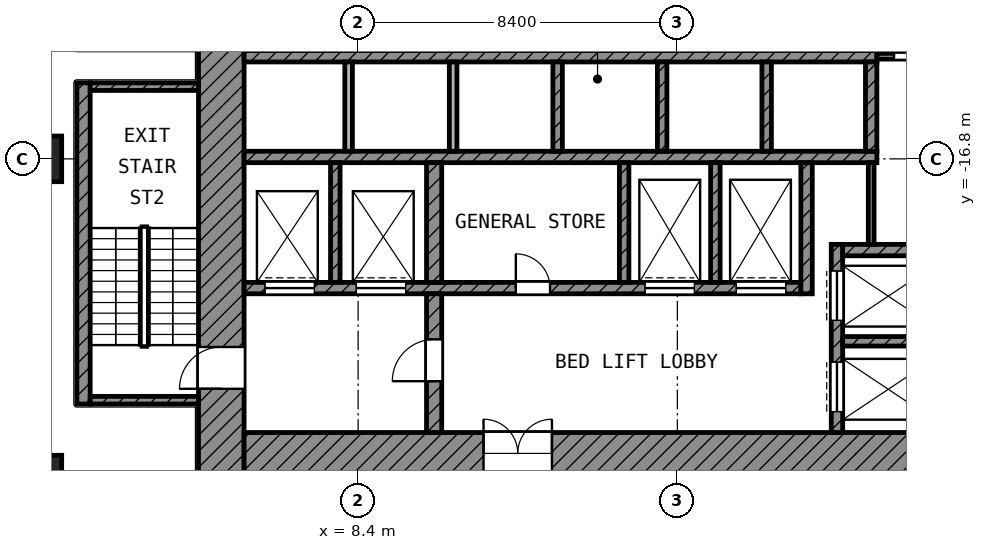
"""IFC4 building model, lengths in metres.
Left out: names, types, materials, properties, quantities, classifications, styles, units other than length and angle.
Written with IfcOpenShell. Run it as: python <this file> out.ifc"""

import sys

from ifc_helpers import new_model, si_unit, direction, frame, frame_2d, origin, origin_2d, place, context, subcontext, project, spatial, rectangle, extrude, element, fill, save


model = new_model("IFC4")
c1 = context("Model", 3, precision=1e-05, world=origin(), true_north=direction((0.0, 1.0)))
c2 = subcontext(c1, "Body", "Model", "MODEL_VIEW")
j1 = project(units=[si_unit("LENGTHUNIT", "METRE"), si_unit("PLANEANGLEUNIT", "RADIAN")], contexts=[c1])
p1 = place(None, origin())
s1 = spatial("IfcSite", under=j1, at=p1, CompositionType="ELEMENT")
p2 = place(p1, origin())
s2 = spatial("IfcBuilding", under=s1, at=p2, CompositionType="ELEMENT")
p3 = place(p2, frame((0.0, 0.0, 81.2)))
s3 = spatial("IfcBuildingStorey", under=s2, at=p3, CompositionType="ELEMENT", Elevation=81.2)
for number, where, z_axis, x_axis in (
    (1, (0.0, -16.8, 0.0), (0.0, 0.0, 1.0), (1.0, 0.0, 0.0)),
    (2, (0.0, -25.2, 0.0), (0.0, 0.0, 1.0), (1.0, 0.0, 0.0)),
):
    element("IfcColumn", number, at=place(p3, frame(where, z_axis=z_axis, x_axis=x_axis)), inside=s3, PredefinedType="COLUMN", context=c2, shape_type="SweptSolid", body=[
        extrude(rectangle(XDim=1.2, YDim=1.2, at=origin_2d()), origin(), (0.0, 0.0, 1.0), 4.2),
    ])
p4 = place(p3, frame((4.8, -25.1, 0.0), z_axis=(0.0, 0.0, 1.0), x_axis=(0.0, 1.0, 0.0)))
e3 = element("IfcWall", 3, at=p4, inside=s3, PredefinedType="SHEAR", context=c2, shape_type="SweptSolid", body=[
    extrude(rectangle(XDim=19.7, YDim=1.2, at=frame_2d((9.85, 0.0))), origin(), (0.0, 0.0, 1.0), 3.9),
])
p5 = place(p4, frame((11.55, 0.0, 0.0)))
e4 = element("IfcOpeningElement", 4, at=p5, cuts=e3, PredefinedType="OPENING", context=c2, shape_type="SweptSolid", body=[
    extrude(rectangle(XDim=1.1, YDim=2.1, at=frame_2d((0.55, 1.05))), frame((0.0, 0.61, 0.0), z_axis=(0.0, -1.0, 0.0), x_axis=(1.0, 0.0, 0.0)), (0.0, 0.0, 1.0), 1.22),
])
p6 = place(p4, frame((2.25, 0.0, 0.0)))
e5 = element("IfcOpeningElement", 5, at=p6, cuts=e3, PredefinedType="OPENING", context=c2, shape_type="SweptSolid", body=[
    extrude(rectangle(XDim=1.1, YDim=2.1, at=frame_2d((0.55, 1.05))), frame((0.0, 0.61, 0.0), z_axis=(0.0, -1.0, 0.0), x_axis=(1.0, 0.0, 0.0)), (0.0, 0.0, 1.0), 1.22),
])
p7 = place(p3, frame((5.4, -24.55, 0.0), z_axis=(0.0, 0.0, 1.0), x_axis=(1.0, 0.0, 0.0)))
e6 = element("IfcWall", 6, at=p7, inside=s3, PredefinedType="SHEAR", context=c2, shape_type="SweptSolid", body=[
    extrude(rectangle(XDim=18.6, YDim=1.1, at=frame_2d((9.3, 0.0))), origin(), (0.0, 0.0, 1.0), 3.9),
])
p8 = place(p7, frame((6.3, 0.0, 0.0)))
e7 = element("IfcOpeningElement", 7, at=p8, cuts=e6, PredefinedType="OPENING", context=c2, shape_type="SweptSolid", body=[
    extrude(rectangle(XDim=1.8, YDim=2.1, at=frame_2d((0.9, 1.05))), frame((0.0, 0.56, 0.0), z_axis=(0.0, -1.0, 0.0), x_axis=(1.0, 0.0, 0.0)), (0.0, 0.0, 1.0), 1.12),
])
for number, where, z_axis, x_axis in (
    (8, (5.4, -14.1, 0.0), (0.0, 0.0, 1.0), (1.0, 0.0, 0.0)),
    (9, (5.4, -16.75, 0.0), (0.0, 0.0, 1.0), (1.0, 0.0, 0.0)),
):
    element("IfcWall", number, at=place(p3, frame(where, z_axis=z_axis, x_axis=x_axis)), inside=s3, PredefinedType="SHEAR", context=c2, shape_type="SweptSolid", body=[
        extrude(rectangle(XDim=16.65, YDim=0.3, at=frame_2d((8.325, 0.0))), origin(), (0.0, 0.0, 1.0), 3.9),
    ])
p9 = place(p3, frame((5.4, -20.2, 0.0), z_axis=(0.0, 0.0, 1.0), x_axis=(1.0, 0.0, 0.0)))
e10 = element("IfcWall", 10, at=p9, inside=s3, PredefinedType="SHEAR", context=c2, shape_type="SweptSolid", body=[
    extrude(rectangle(XDim=14.65, YDim=0.3, at=frame_2d((7.325, 0.0))), origin(), (0.0, 0.0, 1.0), 3.9),
])
p10 = place(p9, frame((10.55, 0.0, 0.0)))
e11 = element("IfcOpeningElement", 11, at=p10, cuts=e10, PredefinedType="OPENING", context=c2, shape_type="SweptSolid", body=[
    extrude(rectangle(XDim=1.3, YDim=2.1, at=frame_2d((0.65, 1.05))), frame((0.0, 0.16, 0.0), z_axis=(0.0, -1.0, 0.0), x_axis=(1.0, 0.0, 0.0)), (0.0, 0.0, 1.0), 0.32),
])
p11 = place(p9, frame((12.95, 0.0, 0.0)))
e12 = element("IfcOpeningElement", 12, at=p11, cuts=e10, PredefinedType="OPENING", context=c2, shape_type="SweptSolid", body=[
    extrude(rectangle(XDim=1.3, YDim=2.1, at=frame_2d((0.65, 1.05))), frame((0.0, 0.16, 0.0), z_axis=(0.0, -1.0, 0.0), x_axis=(1.0, 0.0, 0.0)), (0.0, 0.0, 1.0), 0.32),
])
p12 = place(p9, frame((0.55, 0.0, 0.0)))
e13 = element("IfcOpeningElement", 13, at=p12, cuts=e10, PredefinedType="OPENING", context=c2, shape_type="SweptSolid", body=[
    extrude(rectangle(XDim=1.3, YDim=2.1, at=frame_2d((0.65, 1.05))), frame((0.0, 0.16, 0.0), z_axis=(0.0, -1.0, 0.0), x_axis=(1.0, 0.0, 0.0)), (0.0, 0.0, 1.0), 0.32),
])
p13 = place(p9, frame((2.95, 0.0, 0.0)))
e14 = element("IfcOpeningElement", 14, at=p13, cuts=e10, PredefinedType="OPENING", context=c2, shape_type="SweptSolid", body=[
    extrude(rectangle(XDim=1.3, YDim=2.1, at=frame_2d((0.65, 1.05))), frame((0.0, 0.16, 0.0), z_axis=(0.0, -1.0, 0.0), x_axis=(1.0, 0.0, 0.0)), (0.0, 0.0, 1.0), 0.32),
])
p14 = place(p9, frame((7.15, 0.0, 0.0)))
e15 = element("IfcOpeningElement", 15, at=p14, cuts=e10, PredefinedType="OPENING", context=c2, shape_type="SweptSolid", body=[
    extrude(rectangle(XDim=0.9, YDim=2.1, at=frame_2d((0.45, 1.05))), frame((0.0, 0.16, 0.0), z_axis=(0.0, -1.0, 0.0), x_axis=(1.0, 0.0, 0.0)), (0.0, 0.0, 1.0), 0.32),
])
p15 = place(p3, frame((10.4, -24.0, 0.0), z_axis=(0.0, 0.0, 1.0), x_axis=(0.0, 1.0, 0.0)))
e16 = element("IfcWall", 16, at=p15, inside=s3, PredefinedType="SHEAR", context=c2, shape_type="SweptSolid", body=[
    extrude(rectangle(XDim=3.65, YDim=0.4, at=frame_2d((1.825, 0.0))), origin(), (0.0, 0.0, 1.0), 3.9),
])
p16 = place(p15, frame((1.35, 0.0, 0.0)))
e17 = element("IfcOpeningElement", 17, at=p16, cuts=e16, PredefinedType="OPENING", context=c2, shape_type="SweptSolid", body=[
    extrude(rectangle(XDim=1.1, YDim=2.1, at=frame_2d((0.55, 1.05))), frame((0.0, 0.21, 0.0), z_axis=(0.0, -1.0, 0.0), x_axis=(1.0, 0.0, 0.0)), (0.0, 0.0, 1.0), 0.42),
])
p17 = place(p3, frame((10.4, -20.05, 0.0), z_axis=(0.0, 0.0, 1.0), x_axis=(0.0, 1.0, 0.0)))
e18 = element("IfcWall", 18, at=p17, inside=s3, PredefinedType="SHEAR", context=c2, shape_type="SweptSolid", body=[
    extrude(rectangle(XDim=3.15, YDim=0.4, at=frame_2d((1.575, 0.0))), origin(), (0.0, 0.0, 1.0), 3.9),
])
p18 = place(p3, frame((20.2, -20.35, 0.0), z_axis=(0.0, 0.0, 1.0), x_axis=(0.0, 1.0, 0.0)))
e19 = element("IfcWall", 19, at=p18, inside=s3, PredefinedType="SHEAR", context=c2, shape_type="SweptSolid", body=[
    extrude(rectangle(XDim=3.45, YDim=0.3, at=frame_2d((1.725, 0.0))), origin(), (0.0, 0.0, 1.0), 3.9),
])
p19 = place(p3, frame((21.9, -16.6, 0.0), z_axis=(0.0, 0.0, 1.0), x_axis=(0.0, 1.0, 0.0)))
e20 = element("IfcWall", 20, at=p19, inside=s3, PredefinedType="SHEAR", context=c2, shape_type="SweptSolid", body=[
    extrude(rectangle(XDim=2.35, YDim=0.3, at=frame_2d((1.175, 0.0))), origin(), (0.0, 0.0, 1.0), 3.9),
])
p20 = place(p3, frame((21.15, -19.2, 0.0), z_axis=(0.0, 0.0, 1.0), x_axis=(1.0, 0.0, 0.0)))
e21 = element("IfcWall", 21, at=p20, inside=s3, PredefinedType="SHEAR", context=c2, shape_type="SweptSolid", body=[
    extrude(rectangle(XDim=2.85, YDim=0.3, at=frame_2d((1.425, 0.0))), origin(), (0.0, 0.0, 1.0), 3.9),
])
p21 = place(p3, frame((21.0, -24.0, 0.0), z_axis=(0.0, 0.0, 1.0), x_axis=(0.0, 1.0, 0.0)))
e22 = element("IfcWall", 22, at=p21, inside=s3, PredefinedType="SHEAR", context=c2, shape_type="SweptSolid", body=[
    extrude(rectangle(XDim=4.95, YDim=0.3, at=frame_2d((2.475, 0.0))), origin(), (0.0, 0.0, 1.0), 3.9),
])
p22 = place(p21, frame((2.95, 0.0, 0.0)))
e23 = element("IfcOpeningElement", 23, at=p22, cuts=e22, PredefinedType="OPENING", context=c2, shape_type="SweptSolid", body=[
    extrude(rectangle(XDim=1.3, YDim=2.1, at=frame_2d((0.65, 1.05))), frame((0.0, 0.16, 0.0), z_axis=(0.0, -1.0, 0.0), x_axis=(1.0, 0.0, 0.0)), (0.0, 0.0, 1.0), 0.32),
])
p23 = place(p21, frame((0.55, 0.0, 0.0)))
e24 = element("IfcOpeningElement", 24, at=p23, cuts=e22, PredefinedType="OPENING", context=c2, shape_type="SweptSolid", body=[
    extrude(rectangle(XDim=1.3, YDim=2.1, at=frame_2d((0.65, 1.05))), frame((0.0, 0.16, 0.0), z_axis=(0.0, -1.0, 0.0), x_axis=(1.0, 0.0, 0.0)), (0.0, 0.0, 1.0), 0.32),
])
p24 = place(p3, frame((21.15, -21.6, 0.0), z_axis=(0.0, 0.0, 1.0), x_axis=(1.0, 0.0, 0.0)))
e25 = element("IfcWall", 25, at=p24, inside=s3, PredefinedType="SHEAR", context=c2, shape_type="SweptSolid", body=[
    extrude(rectangle(XDim=2.85, YDim=0.25, at=frame_2d((1.425, 0.0))), origin(), (0.0, 0.0, 1.0), 3.9),
])
for number, where, z_axis, x_axis in (
    (26, (7.8, -20.05, 0.0), (0.0, 0.0, 1.0), (0.0, 1.0, 0.0)),
    (27, (15.4, -20.05, 0.0), (0.0, 0.0, 1.0), (0.0, 1.0, 0.0)),
    (28, (17.8, -20.05, 0.0), (0.0, 0.0, 1.0), (0.0, 1.0, 0.0)),
):
    element("IfcWall", number, at=place(p3, frame(where, z_axis=z_axis, x_axis=x_axis)), inside=s3, PredefinedType="SHEAR", context=c2, shape_type="SweptSolid", body=[
        extrude(rectangle(XDim=3.15, YDim=0.25, at=frame_2d((1.575, 0.0))), origin(), (0.0, 0.0, 1.0), 3.9),
    ])
for number, where, z_axis, x_axis in (
    (29, (8.15, -16.6, 0.0), (0.0, 0.0, 1.0), (0.0, 1.0, 0.0)),
    (30, (10.9, -16.6, 0.0), (0.0, 0.0, 1.0), (0.0, 1.0, 0.0)),
):
    element("IfcWall", number, at=place(p3, frame(where, z_axis=z_axis, x_axis=x_axis)), inside=s3, PredefinedType="PARTITIONING", context=c2, shape_type="SweptSolid", body=[
        extrude(rectangle(XDim=2.35, YDim=0.2, at=frame_2d((1.175, 0.0))), origin(), (0.0, 0.0, 1.0), 3.9),
    ])
for number, where, z_axis, x_axis in (
    (31, (13.65, -16.6, 0.0), (0.0, 0.0, 1.0), (0.0, 1.0, 0.0)),
    (32, (16.4, -16.6, 0.0), (0.0, 0.0, 1.0), (0.0, 1.0, 0.0)),
    (33, (19.15, -16.6, 0.0), (0.0, 0.0, 1.0), (0.0, 1.0, 0.0)),
):
    element("IfcWall", number, at=place(p3, frame(where, z_axis=z_axis, x_axis=x_axis)), inside=s3, PredefinedType="SHEAR", context=c2, shape_type="SweptSolid", body=[
        extrude(rectangle(XDim=2.35, YDim=0.25, at=frame_2d((1.175, 0.0))), origin(), (0.0, 0.0, 1.0), 3.9),
    ])
p25 = place(p3, frame((21.9, -19.05, 0.0), z_axis=(0.0, 0.0, 1.0), x_axis=(0.0, 1.0, 0.0)))
e34 = element("IfcWall", 34, at=p25, inside=s3, PredefinedType="PARTITIONING", context=c2, shape_type="SweptSolid", body=[
    extrude(rectangle(XDim=2.15, YDim=0.15, at=frame_2d((1.075, 0.0))), origin(), (0.0, 0.0, 1.0), 3.9),
])
p26 = place(p3, frame((22.05, -14.1, 0.0), z_axis=(0.0, 0.0, 1.0), x_axis=(1.0, 0.0, 0.0)))
e35 = element("IfcWall", 35, at=p26, inside=s3, PredefinedType="PARTITIONING", context=c2, shape_type="SweptSolid", body=[
    extrude(rectangle(XDim=1.95, YDim=0.15, at=frame_2d((0.975, 0.0))), origin(), (0.0, 0.0, 1.0), 3.9),
])
p27 = place(p26, frame((0.45, 0.0, 0.0)))
e36 = element("IfcOpeningElement", 36, at=p27, cuts=e35, PredefinedType="OPENING", context=c2, shape_type="SweptSolid", body=[
    extrude(rectangle(XDim=0.9, YDim=2.1, at=frame_2d((0.45, 1.05))), frame((0.0, 0.085, 0.0), z_axis=(0.0, -1.0, 0.0), x_axis=(1.0, 0.0, 0.0)), (0.0, 0.0, 1.0), 0.17),
])
p28 = place(p3, frame((1.175, -23.25, 0.0), z_axis=(0.0, 0.0, 1.0), x_axis=(0.0, 1.0, 0.0)))
e37 = element("IfcWall", 37, at=p28, inside=s3, PredefinedType="SHEAR", context=c2, shape_type="SweptSolid", body=[
    extrude(rectangle(XDim=8.45, YDim=0.35, at=frame_2d((4.225, 0.0))), origin(), (0.0, 0.0, 1.0), 3.9),
])
for number, where, z_axis, x_axis in (
    (38, (1.35, -14.9, 0.0), (0.0, 0.0, 1.0), (1.0, 0.0, 0.0)),
    (39, (1.35, -23.15, 0.0), (0.0, 0.0, 1.0), (1.0, 0.0, 0.0)),
):
    element("IfcWall", number, at=place(p3, frame(where, z_axis=z_axis, x_axis=x_axis)), inside=s3, PredefinedType="SHEAR", context=c2, shape_type="SweptSolid", body=[
        extrude(rectangle(XDim=2.85, YDim=0.2, at=frame_2d((1.425, 0.0))), origin(), (0.0, 0.0, 1.0), 3.9),
    ])
p29 = place(p22, origin())
e40 = element("IfcDoor", 40, at=p29, inside=s3, OperationType="DOUBLE_DOOR_SLIDING", PredefinedType="DOOR", context=c2, shape_type="SweptSolid", body=[
    extrude(rectangle(XDim=1.3, YDim=2.1, at=frame_2d((0.65, 1.05))), frame((0.0, 0.025, 0.0), z_axis=(0.0, -1.0, 0.0), x_axis=(1.0, 0.0, 0.0)), (0.0, 0.0, 1.0), 0.05),
])
fill(e23, e40)
p30 = place(p23, origin())
e41 = element("IfcDoor", 41, at=p30, inside=s3, OperationType="DOUBLE_DOOR_SLIDING", PredefinedType="DOOR", context=c2, shape_type="SweptSolid", body=[
    extrude(rectangle(XDim=1.3, YDim=2.1, at=frame_2d((0.65, 1.05))), frame((0.0, 0.025, 0.0), z_axis=(0.0, -1.0, 0.0), x_axis=(1.0, 0.0, 0.0)), (0.0, 0.0, 1.0), 0.05),
])
fill(e24, e41)
p31 = place(p10, origin())
e42 = element("IfcDoor", 42, at=p31, inside=s3, OperationType="DOUBLE_DOOR_SLIDING", PredefinedType="DOOR", context=c2, shape_type="SweptSolid", body=[
    extrude(rectangle(XDim=1.3, YDim=2.1, at=frame_2d((0.65, 1.05))), frame((0.0, 0.025, 0.0), z_axis=(0.0, -1.0, 0.0), x_axis=(1.0, 0.0, 0.0)), (0.0, 0.0, 1.0), 0.05),
])
fill(e11, e42)
p32 = place(p11, origin())
e43 = element("IfcDoor", 43, at=p32, inside=s3, OperationType="DOUBLE_DOOR_SLIDING", PredefinedType="DOOR", context=c2, shape_type="SweptSolid", body=[
    extrude(rectangle(XDim=1.3, YDim=2.1, at=frame_2d((0.65, 1.05))), frame((0.0, 0.025, 0.0), z_axis=(0.0, -1.0, 0.0), x_axis=(1.0, 0.0, 0.0)), (0.0, 0.0, 1.0), 0.05),
])
fill(e12, e43)
p33 = place(p12, origin())
e44 = element("IfcDoor", 44, at=p33, inside=s3, OperationType="DOUBLE_DOOR_SLIDING", PredefinedType="DOOR", context=c2, shape_type="SweptSolid", body=[
    extrude(rectangle(XDim=1.3, YDim=2.1, at=frame_2d((0.65, 1.05))), frame((0.0, 0.025, 0.0), z_axis=(0.0, -1.0, 0.0), x_axis=(1.0, 0.0, 0.0)), (0.0, 0.0, 1.0), 0.05),
])
fill(e13, e44)
p34 = place(p13, origin())
e45 = element("IfcDoor", 45, at=p34, inside=s3, OperationType="DOUBLE_DOOR_SLIDING", PredefinedType="DOOR", context=c2, shape_type="SweptSolid", body=[
    extrude(rectangle(XDim=1.3, YDim=2.1, at=frame_2d((0.65, 1.05))), frame((0.0, 0.025, 0.0), z_axis=(0.0, -1.0, 0.0), x_axis=(1.0, 0.0, 0.0)), (0.0, 0.0, 1.0), 0.05),
])
fill(e14, e45)
p35 = place(p6, origin())
e46 = element("IfcDoor", 46, at=p35, inside=s3, OperationType="SINGLE_SWING_LEFT", PredefinedType="DOOR", context=c2, shape_type="SweptSolid", body=[
    extrude(rectangle(XDim=1.1, YDim=2.1, at=frame_2d((0.55, 1.05))), frame((0.0, 0.025, 0.0), z_axis=(0.0, -1.0, 0.0), x_axis=(1.0, 0.0, 0.0)), (0.0, 0.0, 1.0), 0.05),
])
fill(e5, e46)
p36 = place(p16, origin())
e47 = element("IfcDoor", 47, at=p36, inside=s3, OperationType="SINGLE_SWING_LEFT", PredefinedType="DOOR", context=c2, shape_type="SweptSolid", body=[
    extrude(rectangle(XDim=1.1, YDim=2.1, at=frame_2d((0.55, 1.05))), frame((0.0, 0.025, 0.0), z_axis=(0.0, -1.0, 0.0), x_axis=(1.0, 0.0, 0.0)), (0.0, 0.0, 1.0), 0.05),
])
fill(e17, e47)
p37 = place(p8, origin())
e48 = element("IfcDoor", 48, at=p37, inside=s3, OperationType="DOUBLE_DOOR_SINGLE_SWING", PredefinedType="DOOR", context=c2, shape_type="SweptSolid", body=[
    extrude(rectangle(XDim=1.8, YDim=2.1, at=frame_2d((0.9, 1.05))), frame((0.0, 0.025, 0.0), z_axis=(0.0, -1.0, 0.0), x_axis=(1.0, 0.0, 0.0)), (0.0, 0.0, 1.0), 0.05),
])
fill(e7, e48)
p38 = place(p27, origin())
e49 = element("IfcDoor", 49, at=p38, inside=s3, OperationType="SINGLE_SWING_LEFT", PredefinedType="DOOR", context=c2, shape_type="SweptSolid", body=[
    extrude(rectangle(XDim=0.9, YDim=2.1, at=frame_2d((0.45, 1.05))), frame((0.0, 0.025, 0.0), z_axis=(0.0, -1.0, 0.0), x_axis=(1.0, 0.0, 0.0)), (0.0, 0.0, 1.0), 0.05),
])
fill(e36, e49)
p39 = place(p14, origin())
e50 = element("IfcDoor", 50, at=p39, inside=s3, OperationType="SINGLE_SWING_LEFT", PredefinedType="DOOR", context=c2, shape_type="SweptSolid", body=[
    extrude(rectangle(XDim=0.9, YDim=2.1, at=frame_2d((0.45, 1.05))), frame((0.0, 0.025, 0.0), z_axis=(0.0, -1.0, 0.0), x_axis=(1.0, 0.0, 0.0)), (0.0, 0.0, 1.0), 0.05),
])
fill(e15, e50)
save(model, sys.argv[1])
